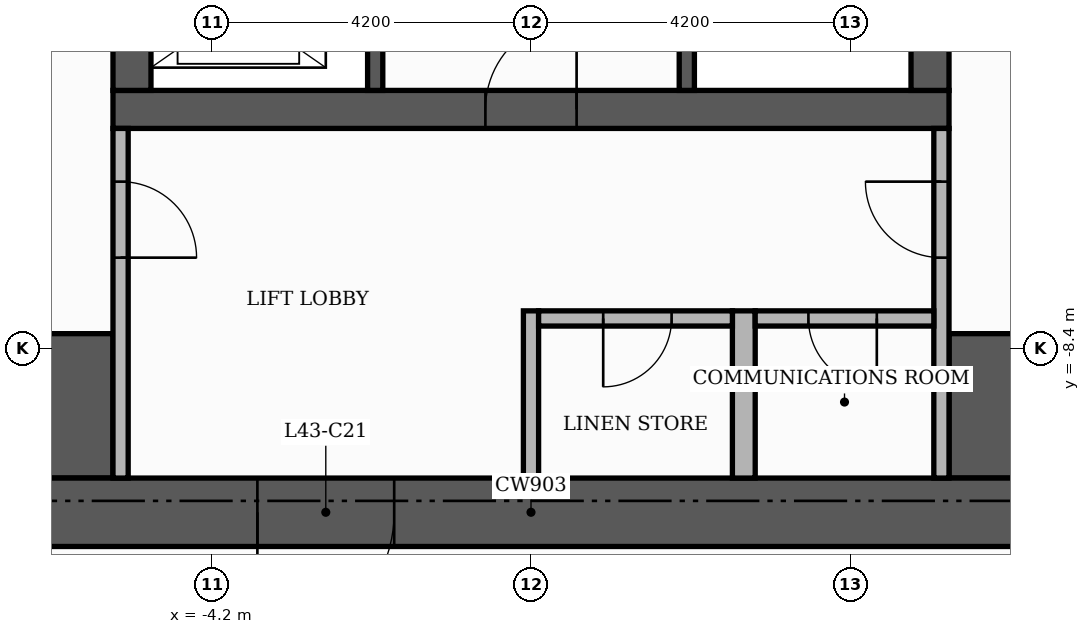
"""IFC4 building model, lengths in metres.
Left out: names, types, materials, properties, quantities, classifications, styles, units other than length and angle.
Written with IfcOpenShell. Run it as: python <this file> out.ifc"""

import sys

from ifc_helpers import new_model, si_unit, direction, frame, frame_2d, origin, place, context, subcontext, project, spatial, rectangle, extrude, element, fill, save


model = new_model("IFC4")
c1 = context("Model", 3, precision=1e-05, world=origin(), true_north=direction((0.0, 1.0)))
c2 = subcontext(c1, "Body", "Model", "MODEL_VIEW")
j1 = project(units=[si_unit("LENGTHUNIT", "METRE"), si_unit("PLANEANGLEUNIT", "RADIAN")], contexts=[c1])
p1 = place(None, origin())
s1 = spatial("IfcSite", under=j1, at=p1, CompositionType="ELEMENT")
p2 = place(p1, origin())
s2 = spatial("IfcBuilding", under=s1, at=p2, CompositionType="ELEMENT")
p3 = place(p2, frame((0.0, 0.0, 180.6)))
s3 = spatial("IfcBuildingStorey", under=s2, at=p3, CompositionType="ELEMENT", Elevation=180.6)
p4 = place(p3, frame((-5.5, -5.25, 0.0), z_axis=(0.0, 0.0, 1.0), x_axis=(1.0, 0.0, 0.0)))
e1 = element("IfcWall", 1, at=p4, inside=s3, PredefinedType="SHEAR", context=c2, shape_type="SweptSolid", body=[
    extrude(rectangle(XDim=11.0, YDim=0.5, at=frame_2d((5.5, 0.0))), origin(), (0.0, 0.0, 1.0), 7.38),
])
p5 = place(p4, frame((4.9, 0.0, 0.0)))
e2 = element("IfcOpeningElement", 2, at=p5, cuts=e1, PredefinedType="OPENING", context=c2, shape_type="SweptSolid", body=[
    extrude(rectangle(XDim=1.2, YDim=2.1, at=frame_2d((0.6, 1.05))), frame((0.0, 0.26, 0.0), z_axis=(0.0, -1.0, 0.0), x_axis=(1.0, 0.0, 0.0)), (0.0, 0.0, 1.0), 0.52),
])
for number, where, z_axis, x_axis in (
    (3, (-5.25, -5.0, 0.0), (0.0, 0.0, 1.0), (0.0, 1.0, 0.0)),
    (4, (5.25, -5.0, 0.0), (0.0, 0.0, 1.0), (0.0, 1.0, 0.0)),
):
    element("IfcWall", number, at=place(p3, frame(where, z_axis=z_axis, x_axis=x_axis)), inside=s3, PredefinedType="SHEAR", context=c2, shape_type="SweptSolid", body=[
        extrude(rectangle(XDim=10.5, YDim=0.5, at=frame_2d((5.25, 0.0))), origin(), (0.0, 0.0, 1.0), 7.38),
    ])
for number, where, z_axis, x_axis in (
    (5, (-10.1, -9.15, 0.0), (0.0, 0.0, 1.0), (1.0, 0.0, 0.0)),
    (6, (5.5, -9.15, 0.0), (0.0, 0.0, 1.0), (1.0, 0.0, 0.0)),
):
    element("IfcWall", number, at=place(p3, frame(where, z_axis=z_axis, x_axis=x_axis)), inside=s3, PredefinedType="SHEAR", context=c2, shape_type="SweptSolid", body=[
        extrude(rectangle(XDim=4.6, YDim=1.9, at=frame_2d((2.3, 0.0))), origin(), (0.0, 0.0, 1.0), 7.38),
    ])
p6 = place(p3, frame((2.05, -5.0, 0.0), z_axis=(0.0, 0.0, 1.0), x_axis=(0.0, 1.0, 0.0)))
e7 = element("IfcWall", 7, at=p6, inside=s3, PredefinedType="SHEAR", context=c2, shape_type="SweptSolid", body=[
    extrude(rectangle(XDim=6.6, YDim=0.2, at=frame_2d((3.3, 0.0))), origin(), (0.0, 0.0, 1.0), 7.38),
])
p7 = place(p6, frame((5.25, 0.0, 0.0)))
e8 = element("IfcOpeningElement", 8, at=p7, cuts=e7, PredefinedType="OPENING", context=c2, shape_type="SweptSolid", body=[
    extrude(rectangle(XDim=1.0, YDim=2.1, at=frame_2d((0.5, 1.05))), frame((0.0, 0.11, 0.0), z_axis=(0.0, -1.0, 0.0), x_axis=(1.0, 0.0, 0.0)), (0.0, 0.0, 1.0), 0.22),
])
p8 = place(p3, frame((-2.05, -5.0, 0.0), z_axis=(0.0, 0.0, 1.0), x_axis=(0.0, 1.0, 0.0)))
e9 = element("IfcWall", 9, at=p8, inside=s3, PredefinedType="SHEAR", context=c2, shape_type="SweptSolid", body=[
    extrude(rectangle(XDim=3.4, YDim=0.2, at=frame_2d((1.7, 0.0))), origin(), (0.0, 0.0, 1.0), 7.38),
])
p9 = place(p8, frame((0.55, 0.0, 0.0)))
e10 = element("IfcOpeningElement", 10, at=p9, cuts=e9, PredefinedType="OPENING", context=c2, shape_type="SweptSolid", body=[
    extrude(rectangle(XDim=1.1, YDim=2.1, at=frame_2d((0.55, 1.05))), frame((0.0, 0.11, 0.0), z_axis=(0.0, -1.0, 0.0), x_axis=(1.0, 0.0, 0.0)), (0.0, 0.0, 1.0), 0.22),
])
p10 = place(p8, frame((2.45, 0.0, 0.0)))
e11 = element("IfcOpeningElement", 11, at=p10, cuts=e9, PredefinedType="OPENING", context=c2, shape_type="SweptSolid", body=[
    extrude(rectangle(XDim=0.8, YDim=2.1, at=frame_2d((0.4, 1.05))), frame((0.0, 0.11, 0.0), z_axis=(0.0, -1.0, 0.0), x_axis=(1.0, 0.0, 0.0)), (0.0, 0.0, 1.0), 0.22),
])
p11 = place(p3, frame((-11.0, -10.55, 0.0), z_axis=(0.0, 0.0, 1.0), x_axis=(1.0, 0.0, 0.0)))
e12 = element("IfcWall", 12, at=p11, inside=s3, PredefinedType="SHEAR", context=c2, shape_type="SweptSolid", body=[
    extrude(rectangle(XDim=22.0, YDim=0.9, at=frame_2d((11.0, 0.0))), origin(), (0.0, 0.0, 1.0), 7.38),
])
p12 = place(p11, frame((7.4, 0.0, 0.0)))
e13 = element("IfcOpeningElement", 13, at=p12, cuts=e12, PredefinedType="OPENING", context=c2, shape_type="SweptSolid", body=[
    extrude(rectangle(XDim=1.8, YDim=2.2, at=frame_2d((0.9, 1.1))), frame((0.0, 0.46, 0.0), z_axis=(0.0, -1.0, 0.0), x_axis=(1.0, 0.0, 0.0)), (0.0, 0.0, 1.0), 0.92),
])
p13 = place(p3, frame((-5.4, -10.1, 0.0), z_axis=(0.0, 0.0, 1.0), x_axis=(0.0, 1.0, 0.0)))
e14 = element("IfcWall", 14, at=p13, inside=s3, PredefinedType="PARTITIONING", context=c2, shape_type="SweptSolid", body=[
    extrude(rectangle(XDim=4.6, YDim=0.2, at=frame_2d((2.3, 0.0))), origin(), (0.0, 0.0, 1.0), 7.38),
])
p14 = place(p13, frame((2.9, 0.0, 0.0)))
e15 = element("IfcOpeningElement", 15, at=p14, cuts=e14, PredefinedType="OPENING", context=c2, shape_type="SweptSolid", body=[
    extrude(rectangle(XDim=1.0, YDim=2.1, at=frame_2d((0.5, 1.05))), frame((0.0, 0.11, 0.0), z_axis=(0.0, -1.0, 0.0), x_axis=(1.0, 0.0, 0.0)), (0.0, 0.0, 1.0), 0.22),
])
p15 = place(p3, frame((0.0, -10.1, 0.0), z_axis=(0.0, 0.0, 1.0), x_axis=(0.0, 1.0, 0.0)))
e16 = element("IfcWall", 16, at=p15, inside=s3, PredefinedType="PARTITIONING", context=c2, shape_type="SweptSolid", body=[
    extrude(rectangle(XDim=2.2, YDim=0.2, at=frame_2d((1.1, 0.0))), origin(), (0.0, 0.0, 1.0), 7.38),
])
p16 = place(p3, frame((2.8, -10.1, 0.0), z_axis=(0.0, 0.0, 1.0), x_axis=(0.0, 1.0, 0.0)))
e17 = element("IfcWall", 17, at=p16, inside=s3, PredefinedType="PARTITIONING", context=c2, shape_type="SweptSolid", body=[
    extrude(rectangle(XDim=2.2, YDim=0.3, at=frame_2d((1.1, 0.0))), origin(), (0.0, 0.0, 1.0), 7.38),
])
p17 = place(p3, frame((5.4, -10.1, 0.0), z_axis=(0.0, 0.0, 1.0), x_axis=(0.0, 1.0, 0.0)))
e18 = element("IfcWall", 18, at=p17, inside=s3, PredefinedType="PARTITIONING", context=c2, shape_type="SweptSolid", body=[
    extrude(rectangle(XDim=4.6, YDim=0.2, at=frame_2d((2.3, 0.0))), origin(), (0.0, 0.0, 1.0), 7.38),
])
p18 = place(p17, frame((2.9, 0.0, 0.0)))
e19 = element("IfcOpeningElement", 19, at=p18, cuts=e18, PredefinedType="OPENING", context=c2, shape_type="SweptSolid", body=[
    extrude(rectangle(XDim=1.0, YDim=2.1, at=frame_2d((0.5, 1.05))), frame((0.0, 0.11, 0.0), z_axis=(0.0, -1.0, 0.0), x_axis=(1.0, 0.0, 0.0)), (0.0, 0.0, 1.0), 0.22),
])
p19 = place(p3, frame((0.1, -8.0, 0.0), z_axis=(0.0, 0.0, 1.0), x_axis=(1.0, 0.0, 0.0)))
e20 = element("IfcWall", 20, at=p19, inside=s3, PredefinedType="PARTITIONING", context=c2, shape_type="SweptSolid", body=[
    extrude(rectangle(XDim=2.55, YDim=0.2, at=frame_2d((1.275, 0.0))), origin(), (0.0, 0.0, 1.0), 7.38),
])
p20 = place(p19, frame((0.85, 0.0, 0.0)))
e21 = element("IfcOpeningElement", 21, at=p20, cuts=e20, PredefinedType="OPENING", context=c2, shape_type="SweptSolid", body=[
    extrude(rectangle(XDim=0.9, YDim=2.1, at=frame_2d((0.45, 1.05))), frame((0.0, 0.11, 0.0), z_axis=(0.0, -1.0, 0.0), x_axis=(1.0, 0.0, 0.0)), (0.0, 0.0, 1.0), 0.22),
])
p21 = place(p3, frame((2.95, -8.0, 0.0), z_axis=(0.0, 0.0, 1.0), x_axis=(1.0, 0.0, 0.0)))
e22 = element("IfcWall", 22, at=p21, inside=s3, PredefinedType="PARTITIONING", context=c2, shape_type="SweptSolid", body=[
    extrude(rectangle(XDim=2.35, YDim=0.2, at=frame_2d((1.175, 0.0))), origin(), (0.0, 0.0, 1.0), 7.38),
])
p22 = place(p21, frame((0.7, 0.0, 0.0)))
e23 = element("IfcOpeningElement", 23, at=p22, cuts=e22, PredefinedType="OPENING", context=c2, shape_type="SweptSolid", body=[
    extrude(rectangle(XDim=0.9, YDim=2.1, at=frame_2d((0.45, 1.05))), frame((0.0, 0.11, 0.0), z_axis=(0.0, -1.0, 0.0), x_axis=(1.0, 0.0, 0.0)), (0.0, 0.0, 1.0), 0.22),
])
p23 = place(p5, origin())
e24 = element("IfcDoor", 24, at=p23, inside=s3, OperationType="SINGLE_SWING_RIGHT", PredefinedType="DOOR", context=c2, shape_type="SweptSolid", body=[
    extrude(rectangle(XDim=1.2, YDim=2.1, at=frame_2d((0.6, 1.05))), frame((0.0, 0.025, 0.0), z_axis=(0.0, -1.0, 0.0), x_axis=(1.0, 0.0, 0.0)), (0.0, 0.0, 1.0), 0.05),
])
fill(e2, e24)
p24 = place(p14, frame((1.0, 0.0, 0.0), z_axis=(0.0, 0.0, 1.0), x_axis=(-1.0, 0.0, 0.0)))
e25 = element("IfcDoor", 25, at=p24, inside=s3, OperationType="SINGLE_SWING_LEFT", PredefinedType="DOOR", context=c2, shape_type="SweptSolid", body=[
    extrude(rectangle(XDim=1.0, YDim=2.1, at=frame_2d((0.5, 1.05))), frame((0.0, 0.025, 0.0), z_axis=(0.0, -1.0, 0.0), x_axis=(1.0, 0.0, 0.0)), (0.0, 0.0, 1.0), 0.05),
])
fill(e15, e25)
p25 = place(p18, origin())
e26 = element("IfcDoor", 26, at=p25, inside=s3, OperationType="SINGLE_SWING_RIGHT", PredefinedType="DOOR", context=c2, shape_type="SweptSolid", body=[
    extrude(rectangle(XDim=1.0, YDim=2.1, at=frame_2d((0.5, 1.05))), frame((0.0, 0.025, 0.0), z_axis=(0.0, -1.0, 0.0), x_axis=(1.0, 0.0, 0.0)), (0.0, 0.0, 1.0), 0.05),
])
fill(e19, e26)
p26 = place(p12, frame((1.8, 0.0, 0.0), z_axis=(0.0, 0.0, 1.0), x_axis=(-1.0, 0.0, 0.0)))
e27 = element("IfcDoor", 27, at=p26, inside=s3, OperationType="DOUBLE_DOOR_SINGLE_SWING", PredefinedType="DOOR", context=c2, shape_type="SweptSolid", body=[
    extrude(rectangle(XDim=1.8, YDim=2.2, at=frame_2d((0.9, 1.1))), frame((0.0, 0.025, 0.0), z_axis=(0.0, -1.0, 0.0), x_axis=(1.0, 0.0, 0.0)), (0.0, 0.0, 1.0), 0.05),
])
fill(e13, e27)
p27 = place(p20, frame((0.9, 0.0, 0.0), z_axis=(0.0, 0.0, 1.0), x_axis=(-1.0, 0.0, 0.0)))
e28 = element("IfcDoor", 28, at=p27, inside=s3, OperationType="SINGLE_SWING_LEFT", PredefinedType="DOOR", context=c2, shape_type="SweptSolid", body=[
    extrude(rectangle(XDim=0.9, YDim=2.1, at=frame_2d((0.45, 1.05))), frame((0.0, 0.025, 0.0), z_axis=(0.0, -1.0, 0.0), x_axis=(1.0, 0.0, 0.0)), (0.0, 0.0, 1.0), 0.05),
])
fill(e21, e28)
p28 = place(p22, frame((0.9, 0.0, 0.0), z_axis=(0.0, 0.0, 1.0), x_axis=(-1.0, 0.0, 0.0)))
e29 = element("IfcDoor", 29, at=p28, inside=s3, OperationType="SINGLE_SWING_RIGHT", PredefinedType="DOOR", context=c2, shape_type="SweptSolid", body=[
    extrude(rectangle(XDim=0.9, YDim=2.1, at=frame_2d((0.45, 1.05))), frame((0.0, 0.025, 0.0), z_axis=(0.0, -1.0, 0.0), x_axis=(1.0, 0.0, 0.0)), (0.0, 0.0, 1.0), 0.05),
])
fill(e23, e29)
save(model, sys.argv[1])
